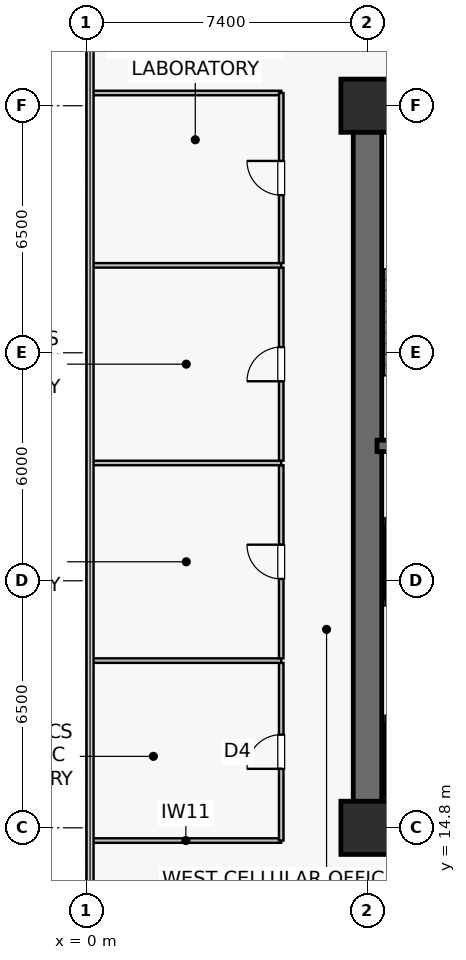
"""IFC4 building model, lengths in metres.
Left out: names, types, materials, properties, quantities, classifications, styles, units other than length and angle.
Written with IfcOpenShell. Run it as: python <this file> out.ifc"""

import sys

from ifc_helpers import new_model, si_unit, direction, frame, frame_2d, origin, origin_2d, place, context, subcontext, project, spatial, rectangle, extrude, source, transform, mapped, element, fill, save


model = new_model("IFC4")
c1 = context("Model", 3, precision=1e-05, world=origin(), true_north=direction((0.0, 1.0)))
c2 = subcontext(c1, "Body", "Model", "MODEL_VIEW")
j1 = project(units=[si_unit("LENGTHUNIT", "METRE"), si_unit("PLANEANGLEUNIT", "RADIAN")], contexts=[c1])
p1 = place(None, origin())
s1 = spatial("IfcSite", under=j1, at=p1, CompositionType="ELEMENT")
p2 = place(p1, origin())
s2 = spatial("IfcBuilding", under=s1, at=p2, CompositionType="ELEMENT")
p3 = place(p2, frame((0.0, 0.0, 53.9)))
s3 = spatial("IfcBuildingStorey", under=s2, at=p3, CompositionType="ELEMENT", Elevation=53.9)
p4 = place(p3, frame((7.025, 14.8, 0.0), z_axis=(0.0, 0.0, 1.0), x_axis=(1.0, 0.0, 0.0)))
e1 = element("IfcWall", 1, at=p4, inside=s3, PredefinedType="SHEAR", context=c2, shape_type="SweptSolid", body=[
    extrude(rectangle(XDim=15.55, YDim=0.75, at=frame_2d((7.775, 0.0))), origin(), (0.0, 0.0, 1.0), 3.78),
])
p5 = place(p3, frame((7.025, 33.8, 0.0), z_axis=(0.0, 0.0, 1.0), x_axis=(1.0, 0.0, 0.0)))
e2 = element("IfcWall", 2, at=p5, inside=s3, PredefinedType="SHEAR", context=c2, shape_type="SweptSolid", body=[
    extrude(rectangle(XDim=15.55, YDim=0.75, at=frame_2d((7.775, 0.0))), origin(), (0.0, 0.0, 1.0), 3.78),
])
p6 = place(p5, frame((8.425, 0.0, 0.0)))
e3 = element("IfcOpeningElement", 3, at=p6, cuts=e2, PredefinedType="OPENING", context=c2, shape_type="SweptSolid", body=[
    extrude(rectangle(XDim=0.95, YDim=2.15, at=frame_2d((0.475, 1.075))), frame((0.0, 0.385, 0.0), z_axis=(0.0, -1.0, 0.0), x_axis=(1.0, 0.0, 0.0)), (0.0, 0.0, 1.0), 0.77),
])
p7 = place(p5, frame((11.965, 0.0, 0.0)))
e4 = element("IfcOpeningElement", 4, at=p7, cuts=e2, PredefinedType="OPENING", context=c2, shape_type="SweptSolid", body=[
    extrude(rectangle(XDim=0.95, YDim=2.15, at=frame_2d((0.475, 1.075))), frame((0.0, 0.385, 0.0), z_axis=(0.0, -1.0, 0.0), x_axis=(1.0, 0.0, 0.0)), (0.0, 0.0, 1.0), 0.77),
])
p8 = place(p3, frame((7.4, 15.175, 0.0), z_axis=(0.0, 0.0, 1.0), x_axis=(0.0, 1.0, 0.0)))
e5 = element("IfcWall", 5, at=p8, inside=s3, PredefinedType="SHEAR", context=c2, shape_type="SweptSolid", body=[
    extrude(rectangle(XDim=18.25, YDim=0.75, at=frame_2d((9.125, 0.0))), origin(), (0.0, 0.0, 1.0), 3.78),
])
p9 = place(p3, frame((7.65, 24.85, 0.0), z_axis=(0.0, 0.0, 1.0), x_axis=(1.0, 0.0, 0.0)))
e6 = element("IfcWall", 6, at=p9, inside=s3, PredefinedType="SHEAR", context=c2, shape_type="SweptSolid", body=[
    extrude(rectangle(XDim=3.8, YDim=0.3, at=frame_2d((1.9, 0.0))), origin(), (0.0, 0.0, 1.0), 3.78),
])
p10 = place(p3, frame((7.73, 33.4, 0.0), z_axis=(0.0, 0.0, 1.0), x_axis=(1.0, 0.0, 0.0)))
e7 = element("IfcWall", 7, at=p10, inside=s3, PredefinedType="SOLIDWALL", context=c2, shape_type="SweptSolid", body=[
    extrude(rectangle(XDim=3.72, YDim=0.12, at=frame_2d((1.86, 0.0))), origin(), (0.0, 0.0, 1.0), 3.78),
])
m1 = source(origin(), c2, "Body", "SweptSolid", [
    extrude(rectangle(XDim=1.4, YDim=1.4, at=origin_2d()), origin(), (0.0, 0.0, 1.0), 4.1),
])
for number, where, z_axis, x_axis in (
    (8, (7.4, 14.8, 0.0), (0.0, 0.0, 1.0), (1.0, 0.0, 0.0)),
    (9, (7.4, 33.8, 0.0), (0.0, 0.0, 1.0), (1.0, 0.0, 0.0)),
):
    element("IfcColumn", number, at=place(p3, frame(where, z_axis=z_axis, x_axis=x_axis)), inside=s3, PredefinedType="COLUMN", context=c2, shape_type="MappedRepresentation", body=[
        mapped(m1, transform((0.0, 0.0, 0.0), scale=1.0)),
    ])
p11 = place(p3, frame((7.87, 17.65, 0.0), z_axis=(0.0, 0.0, 1.0), x_axis=(1.0, 0.0, 0.0)))
e10 = element("IfcWall", 10, at=p11, inside=s3, PredefinedType="SOLIDWALL", context=c2, shape_type="SweptSolid", body=[
    extrude(rectangle(XDim=2.26, YDim=0.2, at=frame_2d((1.13, 0.0))), origin(), (0.0, 0.0, 1.0), 3.78),
])
p12 = place(p11, frame((0.58, 0.0, 0.0)))
e11 = element("IfcOpeningElement", 11, at=p12, cuts=e10, PredefinedType="OPENING", context=c2, shape_type="SweptSolid", body=[
    extrude(rectangle(XDim=1.1, YDim=2.22, at=frame_2d((0.55, 1.11))), frame((0.0, 0.11, 0.0), z_axis=(0.0, -1.0, 0.0), x_axis=(1.0, 0.0, 0.0)), (0.0, 0.0, 1.0), 0.22),
])
p13 = place(p3, frame((7.87, 15.55, 0.0), z_axis=(0.0, 0.0, 1.0), x_axis=(1.0, 0.0, 0.0)))
e12 = element("IfcWall", 12, at=p13, inside=s3, PredefinedType="SOLIDWALL", context=c2, shape_type="SweptSolid", body=[
    extrude(rectangle(XDim=2.26, YDim=0.2, at=frame_2d((1.13, 0.0))), origin(), (0.0, 0.0, 1.0), 3.78),
])
p14 = place(p3, frame((7.95, 15.65, 0.0), z_axis=(0.0, 0.0, 1.0), x_axis=(0.0, 1.0, 0.0)))
e13 = element("IfcWall", 13, at=p14, inside=s3, PredefinedType="SOLIDWALL", context=c2, shape_type="SweptSolid", body=[
    extrude(rectangle(XDim=1.9, YDim=0.18, at=frame_2d((0.95, 0.0))), origin(), (0.0, 0.0, 1.0), 3.78),
])
for number, where, z_axis, x_axis in (
    (14, (7.87, 20.75, 0.0), (0.0, 0.0, 1.0), (1.0, 0.0, 0.0)),
    (15, (7.87, 22.85, 0.0), (0.0, 0.0, 1.0), (1.0, 0.0, 0.0)),
):
    element("IfcWall", number, at=place(p3, frame(where, z_axis=z_axis, x_axis=x_axis)), inside=s3, PredefinedType="SOLIDWALL", context=c2, shape_type="SweptSolid", body=[
        extrude(rectangle(XDim=2.26, YDim=0.2, at=frame_2d((1.13, 0.0))), origin(), (0.0, 0.0, 1.0), 3.78),
    ])
p15 = place(p3, frame((7.95, 20.85, 0.0), z_axis=(0.0, 0.0, 1.0), x_axis=(0.0, 1.0, 0.0)))
e16 = element("IfcWall", 16, at=p15, inside=s3, PredefinedType="SOLIDWALL", context=c2, shape_type="SweptSolid", body=[
    extrude(rectangle(XDim=1.9, YDim=0.18, at=frame_2d((0.95, 0.0))), origin(), (0.0, 0.0, 1.0), 3.78),
])
for number, where, z_axis, x_axis in (
    (17, (0.11, 14.465, 0.0), (0.0, 0.0, 1.0), (1.0, 0.0, 0.0)),
    (18, (0.11, 34.135, 0.0), (0.0, 0.0, 1.0), (1.0, 0.0, 0.0)),
):
    element("IfcWall", number, at=place(p3, frame(where, z_axis=z_axis, x_axis=x_axis)), inside=s3, PredefinedType="PARTITIONING", context=c2, shape_type="SweptSolid", body=[
        extrude(rectangle(XDim=5.02, YDim=0.12, at=frame_2d((2.51, 0.0))), origin(), (0.0, 0.0, 1.0), 3.78),
    ])
p16 = place(p3, frame((5.13, 14.465, 0.0), z_axis=(0.0, 0.0, 1.0), x_axis=(0.0, 1.0, 0.0)))
e19 = element("IfcWall", 19, at=p16, inside=s3, PredefinedType="PARTITIONING", context=c2, shape_type="SweptSolid", body=[
    extrude(rectangle(XDim=4.675, YDim=0.12, at=frame_2d((2.337, 0.0))), origin(), (0.0, 0.0, 1.0), 3.78),
])
p17 = place(p16, frame((1.887, 0.0, 0.0)))
e20 = element("IfcOpeningElement", 20, at=p17, cuts=e19, PredefinedType="OPENING", context=c2, shape_type="SweptSolid", body=[
    extrude(rectangle(XDim=0.9, YDim=2.1, at=frame_2d((0.45, 1.05))), frame((0.0, 0.07, 0.0), z_axis=(0.0, -1.0, 0.0), x_axis=(1.0, 0.0, 0.0)), (0.0, 0.0, 1.0), 0.14),
])
p18 = place(p3, frame((0.11, 19.2, 0.0), z_axis=(0.0, 0.0, 1.0), x_axis=(1.0, 0.0, 0.0)))
e21 = element("IfcWall", 21, at=p18, inside=s3, PredefinedType="PARTITIONING", context=c2, shape_type="SweptSolid", body=[
    extrude(rectangle(XDim=5.02, YDim=0.12, at=frame_2d((2.51, 0.0))), origin(), (0.0, 0.0, 1.0), 3.78),
])
p19 = place(p3, frame((5.13, 19.26, 0.0), z_axis=(0.0, 0.0, 1.0), x_axis=(0.0, 1.0, 0.0)))
e22 = element("IfcWall", 22, at=p19, inside=s3, PredefinedType="PARTITIONING", context=c2, shape_type="SweptSolid", body=[
    extrude(rectangle(XDim=5.08, YDim=0.12, at=frame_2d((2.54, 0.0))), origin(), (0.0, 0.0, 1.0), 3.78),
])
p20 = place(p19, frame((2.09, 0.0, 0.0)))
e23 = element("IfcOpeningElement", 23, at=p20, cuts=e22, PredefinedType="OPENING", context=c2, shape_type="SweptSolid", body=[
    extrude(rectangle(XDim=0.9, YDim=2.1, at=frame_2d((0.45, 1.05))), frame((0.0, 0.07, 0.0), z_axis=(0.0, -1.0, 0.0), x_axis=(1.0, 0.0, 0.0)), (0.0, 0.0, 1.0), 0.14),
])
p21 = place(p3, frame((0.11, 24.4, 0.0), z_axis=(0.0, 0.0, 1.0), x_axis=(1.0, 0.0, 0.0)))
e24 = element("IfcWall", 24, at=p21, inside=s3, PredefinedType="PARTITIONING", context=c2, shape_type="SweptSolid", body=[
    extrude(rectangle(XDim=5.02, YDim=0.12, at=frame_2d((2.51, 0.0))), origin(), (0.0, 0.0, 1.0), 3.78),
])
p22 = place(p3, frame((5.13, 24.46, 0.0), z_axis=(0.0, 0.0, 1.0), x_axis=(0.0, 1.0, 0.0)))
e25 = element("IfcWall", 25, at=p22, inside=s3, PredefinedType="PARTITIONING", context=c2, shape_type="SweptSolid", body=[
    extrude(rectangle(XDim=5.08, YDim=0.12, at=frame_2d((2.54, 0.0))), origin(), (0.0, 0.0, 1.0), 3.78),
])
p23 = place(p22, frame((2.09, 0.0, 0.0)))
e26 = element("IfcOpeningElement", 26, at=p23, cuts=e25, PredefinedType="OPENING", context=c2, shape_type="SweptSolid", body=[
    extrude(rectangle(XDim=0.9, YDim=2.1, at=frame_2d((0.45, 1.05))), frame((0.0, 0.07, 0.0), z_axis=(0.0, -1.0, 0.0), x_axis=(1.0, 0.0, 0.0)), (0.0, 0.0, 1.0), 0.14),
])
p24 = place(p3, frame((0.11, 29.6, 0.0), z_axis=(0.0, 0.0, 1.0), x_axis=(1.0, 0.0, 0.0)))
e27 = element("IfcWall", 27, at=p24, inside=s3, PredefinedType="PARTITIONING", context=c2, shape_type="SweptSolid", body=[
    extrude(rectangle(XDim=5.02, YDim=0.12, at=frame_2d((2.51, 0.0))), origin(), (0.0, 0.0, 1.0), 3.78),
])
p25 = place(p3, frame((5.13, 29.66, 0.0), z_axis=(0.0, 0.0, 1.0), x_axis=(0.0, 1.0, 0.0)))
e28 = element("IfcWall", 28, at=p25, inside=s3, PredefinedType="PARTITIONING", context=c2, shape_type="SweptSolid", body=[
    extrude(rectangle(XDim=4.475, YDim=0.12, at=frame_2d((2.238, 0.0))), origin(), (0.0, 0.0, 1.0), 3.78),
])
p26 = place(p25, frame((1.788, 0.0, 0.0)))
e29 = element("IfcOpeningElement", 29, at=p26, cuts=e28, PredefinedType="OPENING", context=c2, shape_type="SweptSolid", body=[
    extrude(rectangle(XDim=0.9, YDim=2.1, at=frame_2d((0.45, 1.05))), frame((0.0, 0.07, 0.0), z_axis=(0.0, -1.0, 0.0), x_axis=(1.0, 0.0, 0.0)), (0.0, 0.0, 1.0), 0.14),
])
m2 = source(origin(), c2, "Body", "SweptSolid", [
    extrude(rectangle(XDim=0.9, YDim=2.1, at=frame_2d((0.45, 1.05))), frame((0.0, 0.025, 0.0), z_axis=(0.0, -1.0, 0.0), x_axis=(1.0, 0.0, 0.0)), (0.0, 0.0, 1.0), 0.05),
])
p27 = place(p17, origin())
e30 = element("IfcDoor", 30, at=p27, inside=s3, OperationType="SINGLE_SWING_LEFT", PredefinedType="DOOR", context=c2, shape_type="MappedRepresentation", body=[
    mapped(m2, transform((0.0, 0.0, 0.0), scale=1.0)),
])
fill(e20, e30)
p28 = place(p20, origin())
e31 = element("IfcDoor", 31, at=p28, inside=s3, OperationType="SINGLE_SWING_RIGHT", PredefinedType="DOOR", context=c2, shape_type="MappedRepresentation", body=[
    mapped(m2, transform((0.0, 0.0, 0.0), scale=1.0)),
])
fill(e23, e31)
p29 = place(p23, origin())
e32 = element("IfcDoor", 32, at=p29, inside=s3, OperationType="SINGLE_SWING_LEFT", PredefinedType="DOOR", context=c2, shape_type="MappedRepresentation", body=[
    mapped(m2, transform((0.0, 0.0, 0.0), scale=1.0)),
])
fill(e26, e32)
p30 = place(p26, origin())
e33 = element("IfcDoor", 33, at=p30, inside=s3, OperationType="SINGLE_SWING_RIGHT", PredefinedType="DOOR", context=c2, shape_type="MappedRepresentation", body=[
    mapped(m2, transform((0.0, 0.0, 0.0), scale=1.0)),
])
fill(e29, e33)
save(model, sys.argv[1])
